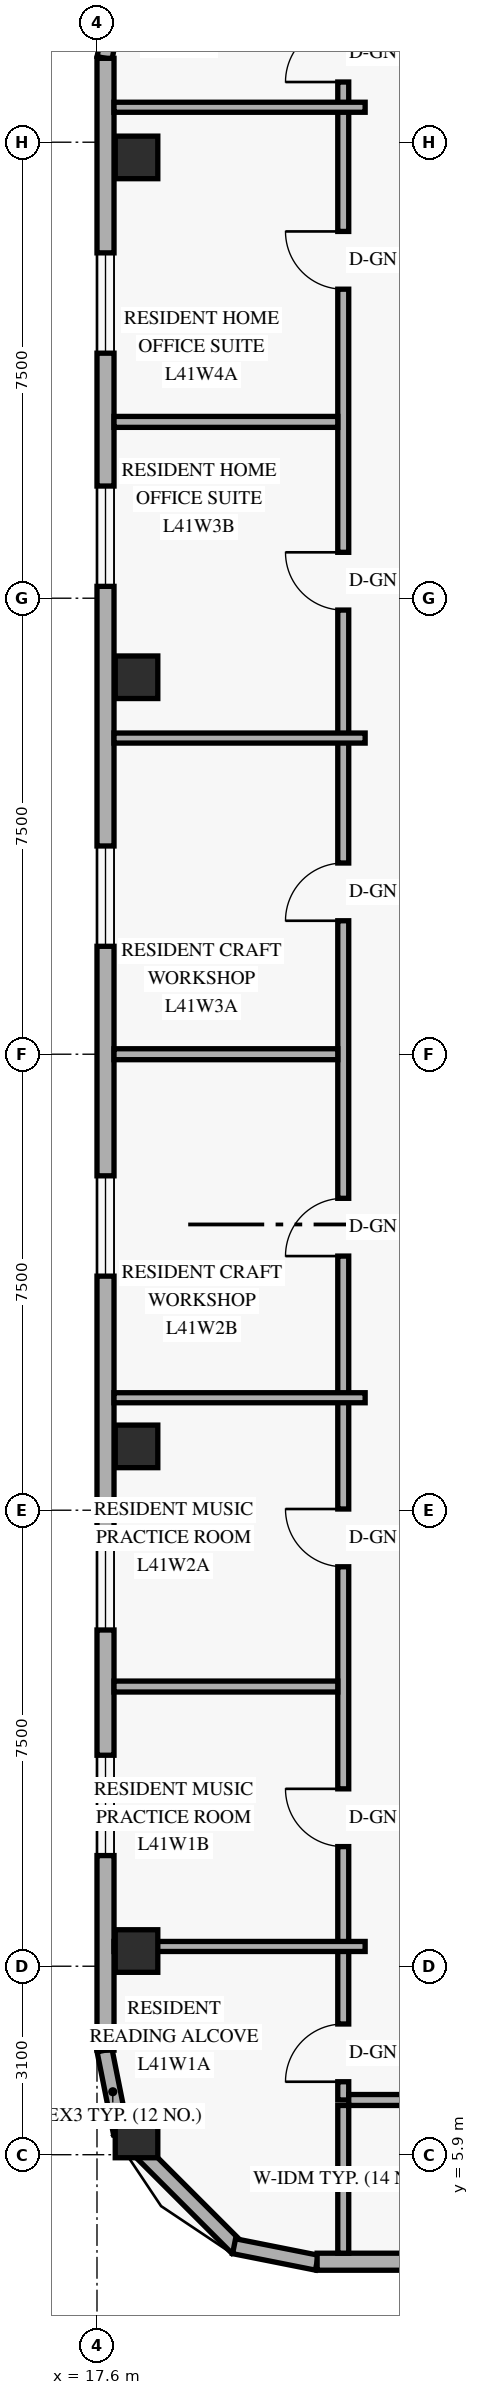
"""IFC4 building model, lengths in metres.
Left out: names, types, materials, properties, quantities, classifications, styles, units other than length and angle.
Written with IfcOpenShell. Run it as: python <this file> out.ifc"""

import sys

from ifc_helpers import new_model, si_unit, direction, frame, frame_2d, origin, origin_2d, place, context, subcontext, project, spatial, rectangle, extrude, element, fill, save


model = new_model("IFC4")
c1 = context("Model", 3, precision=1e-05, world=origin(), true_north=direction((0.0, 1.0)))
c2 = subcontext(c1, "Body", "Model", "MODEL_VIEW")
j1 = project(units=[si_unit("LENGTHUNIT", "METRE"), si_unit("PLANEANGLEUNIT", "RADIAN")], contexts=[c1])
p1 = place(None, origin())
s1 = spatial("IfcSite", under=j1, at=p1, CompositionType="ELEMENT")
p2 = place(p1, origin())
s2 = spatial("IfcBuilding", under=s1, at=p2, CompositionType="ELEMENT")
p3 = place(p2, frame((0.0, 0.0, 159.0)))
s3 = spatial("IfcBuildingStorey", under=s2, at=p3, CompositionType="ELEMENT", Elevation=159.0)
for number, where, z_axis, x_axis in (
    (1, (18.25, 6.2, 0.0), (0.0, 0.0, 1.0), (1.0, 0.0, 0.0)),
    (2, (18.25, 9.25, 0.0), (0.0, 0.0, 1.0), (1.0, 0.0, 0.0)),
    (3, (18.25, 17.55, 0.0), (0.0, 0.0, 1.0), (1.0, 0.0, 0.0)),
    (4, (18.25, 30.2, 0.0), (0.0, 0.0, 1.0), (1.0, 0.0, 0.0)),
    (5, (18.25, 38.75, 0.0), (0.0, 0.0, 1.0), (1.0, 0.0, 0.0)),
):
    element("IfcColumn", number, at=place(p3, frame(where, z_axis=z_axis, x_axis=x_axis)), inside=s3, PredefinedType="COLUMN", context=c2, shape_type="SweptSolid", body=[
        extrude(rectangle(XDim=0.7, YDim=0.7, at=origin_2d()), origin(), (0.0, 0.0, 1.0), 3.6),
    ])
p4 = place(p3, frame((17.724, 7.616, 0.0), z_axis=(0.0, 0.0, 1.0), x_axis=(0.195135625965, -0.9807762678, 0.0)))
e6 = element("IfcWall", 6, at=p4, inside=s3, PredefinedType="SOLIDWALL", context=c2, shape_type="SweptSolid", body=[
    extrude(rectangle(XDim=1.389, YDim=0.25, at=frame_2d((0.694, 0.0))), origin(), (0.0, 0.0, 1.0), 3.36),
])
p5 = place(p3, frame((17.968, 6.305, 0.0), z_axis=(0.0, 0.0, 1.0), x_axis=(0.707106781187, -0.707106781187, 0.0)))
e7 = element("IfcWall", 7, at=p5, inside=s3, PredefinedType="SOLIDWALL", context=c2, shape_type="SweptSolid", body=[
    extrude(rectangle(XDim=2.739, YDim=0.25, at=frame_2d((1.37, 0.0))), origin(), (0.0, 0.0, 1.0), 3.36),
])
for number, where, z_axis, x_axis in (
    (8, (19.854, 4.395, 0.0), (0.0, 0.0, 1.0), (0.981, -0.195, 0.0)),
    (9, (17.995, 41.746, 0.0), (0.0, 0.0, 1.0), (-0.195, -0.981, 0.0)),
):
    element("IfcWall", number, at=place(p3, frame(where, z_axis=z_axis, x_axis=x_axis)), inside=s3, PredefinedType="SOLIDWALL", context=c2, shape_type="SweptSolid", body=[
        extrude(rectangle(XDim=1.389, YDim=0.25, at=frame_2d((0.694, 0.0))), origin(), (0.0, 0.0, 1.0), 3.36),
    ])
p6 = place(p3, frame((21.22, 4.14, 0.0), z_axis=(0.0, 0.0, 1.0), x_axis=(1.0, 0.0, 0.0)))
e10 = element("IfcWall", 10, at=p6, inside=s3, PredefinedType="SOLIDWALL", context=c2, shape_type="SweptSolid", body=[
    extrude(rectangle(XDim=33.76, YDim=0.28, at=frame_2d((16.88, 0.0))), origin(), (0.0, 0.0, 1.0), 3.36),
])
p7 = place(p6, frame((2.13, 0.0, 0.85)))
e11 = element("IfcOpeningElement", 11, at=p7, cuts=e10, PredefinedType="OPENING", context=c2, shape_type="SweptSolid", body=[
    extrude(rectangle(XDim=1.35, YDim=1.55, at=frame_2d((0.675, 0.775))), frame((0.0, 0.15, 0.0), z_axis=(0.0, -1.0, 0.0), x_axis=(1.0, 0.0, 0.0)), (0.0, 0.0, 1.0), 0.3),
])
p8 = place(p6, frame((9.015, 0.0, 0.85)))
e12 = element("IfcOpeningElement", 12, at=p8, cuts=e10, PredefinedType="OPENING", context=c2, shape_type="SweptSolid", body=[
    extrude(rectangle(XDim=1.35, YDim=1.55, at=frame_2d((0.675, 0.775))), frame((0.0, 0.15, 0.0), z_axis=(0.0, -1.0, 0.0), x_axis=(1.0, 0.0, 0.0)), (0.0, 0.0, 1.0), 0.3),
])
p9 = place(p6, frame((14.59, 0.0, 0.85)))
e13 = element("IfcOpeningElement", 13, at=p9, cuts=e10, PredefinedType="OPENING", context=c2, shape_type="SweptSolid", body=[
    extrude(rectangle(XDim=1.35, YDim=1.55, at=frame_2d((0.675, 0.775))), frame((0.0, 0.15, 0.0), z_axis=(0.0, -1.0, 0.0), x_axis=(1.0, 0.0, 0.0)), (0.0, 0.0, 1.0), 0.3),
])
p10 = place(p6, frame((18.635, 0.0, 0.85)))
e14 = element("IfcOpeningElement", 14, at=p10, cuts=e10, PredefinedType="OPENING", context=c2, shape_type="SweptSolid", body=[
    extrude(rectangle(XDim=1.35, YDim=1.55, at=frame_2d((0.675, 0.775))), frame((0.0, 0.15, 0.0), z_axis=(0.0, -1.0, 0.0), x_axis=(1.0, 0.0, 0.0)), (0.0, 0.0, 1.0), 0.3),
])
p11 = place(p6, frame((24.76, 0.0, 0.85)))
e15 = element("IfcOpeningElement", 15, at=p11, cuts=e10, PredefinedType="OPENING", context=c2, shape_type="SweptSolid", body=[
    extrude(rectangle(XDim=1.35, YDim=1.55, at=frame_2d((0.675, 0.775))), frame((0.0, 0.15, 0.0), z_axis=(0.0, -1.0, 0.0), x_axis=(1.0, 0.0, 0.0)), (0.0, 0.0, 1.0), 0.3),
])
p12 = place(p6, frame((30.495, 0.0, 0.85)))
e16 = element("IfcOpeningElement", 16, at=p12, cuts=e10, PredefinedType="OPENING", context=c2, shape_type="SweptSolid", body=[
    extrude(rectangle(XDim=1.35, YDim=1.55, at=frame_2d((0.675, 0.775))), frame((0.0, 0.15, 0.0), z_axis=(0.0, -1.0, 0.0), x_axis=(1.0, 0.0, 0.0)), (0.0, 0.0, 1.0), 0.3),
])
p13 = place(p3, frame((17.74, 40.38, 0.0), z_axis=(0.0, 0.0, 1.0), x_axis=(0.0, -1.0, 0.0)))
e17 = element("IfcWall", 17, at=p13, inside=s3, PredefinedType="SOLIDWALL", context=c2, shape_type="SweptSolid", body=[
    extrude(rectangle(XDim=32.76, YDim=0.28, at=frame_2d((16.38, 0.0))), origin(), (0.0, 0.0, 1.0), 3.36),
])
p14 = place(p13, frame((27.91, 0.0, 0.85)))
e18 = element("IfcOpeningElement", 18, at=p14, cuts=e17, PredefinedType="OPENING", context=c2, shape_type="SweptSolid", body=[
    extrude(rectangle(XDim=1.65, YDim=1.6, at=frame_2d((0.825, 0.8))), frame((0.0, 0.15, 0.0), z_axis=(0.0, -1.0, 0.0), x_axis=(1.0, 0.0, 0.0)), (0.0, 0.0, 1.0), 0.3),
])
p15 = place(p13, frame((24.2, 0.0, 0.85)))
e19 = element("IfcOpeningElement", 19, at=p15, cuts=e17, PredefinedType="OPENING", context=c2, shape_type="SweptSolid", body=[
    extrude(rectangle(XDim=1.65, YDim=1.6, at=frame_2d((0.825, 0.8))), frame((0.0, 0.15, 0.0), z_axis=(0.0, -1.0, 0.0), x_axis=(1.0, 0.0, 0.0)), (0.0, 0.0, 1.0), 0.3),
])
p16 = place(p13, frame((18.38, 0.0, 0.85)))
e20 = element("IfcOpeningElement", 20, at=p16, cuts=e17, PredefinedType="OPENING", context=c2, shape_type="SweptSolid", body=[
    extrude(rectangle(XDim=1.65, YDim=1.6, at=frame_2d((0.825, 0.8))), frame((0.0, 0.15, 0.0), z_axis=(0.0, -1.0, 0.0), x_axis=(1.0, 0.0, 0.0)), (0.0, 0.0, 1.0), 0.3),
])
p17 = place(p13, frame((12.955, 0.0, 0.85)))
e21 = element("IfcOpeningElement", 21, at=p17, cuts=e17, PredefinedType="OPENING", context=c2, shape_type="SweptSolid", body=[
    extrude(rectangle(XDim=1.65, YDim=1.6, at=frame_2d((0.825, 0.8))), frame((0.0, 0.15, 0.0), z_axis=(0.0, -1.0, 0.0), x_axis=(1.0, 0.0, 0.0)), (0.0, 0.0, 1.0), 0.3),
])
p18 = place(p13, frame((7.035, 0.0, 0.85)))
e22 = element("IfcOpeningElement", 22, at=p18, cuts=e17, PredefinedType="OPENING", context=c2, shape_type="SweptSolid", body=[
    extrude(rectangle(XDim=1.65, YDim=1.6, at=frame_2d((0.825, 0.8))), frame((0.0, 0.15, 0.0), z_axis=(0.0, -1.0, 0.0), x_axis=(1.0, 0.0, 0.0)), (0.0, 0.0, 1.0), 0.3),
])
p19 = place(p13, frame((3.2, 0.0, 0.85)))
e23 = element("IfcOpeningElement", 23, at=p19, cuts=e17, PredefinedType="OPENING", context=c2, shape_type="SweptSolid", body=[
    extrude(rectangle(XDim=1.65, YDim=1.6, at=frame_2d((0.825, 0.8))), frame((0.0, 0.15, 0.0), z_axis=(0.0, -1.0, 0.0), x_axis=(1.0, 0.0, 0.0)), (0.0, 0.0, 1.0), 0.3),
])
p20 = place(p3, frame((21.65, 6.8, 0.0), z_axis=(0.0, 0.0, 1.0), x_axis=(0.0, 1.0, 0.0)))
e24 = element("IfcWall", 24, at=p20, inside=s3, PredefinedType="STANDARD", context=c2, shape_type="SweptSolid", body=[
    extrude(rectangle(XDim=34.4, YDim=0.18, at=frame_2d((17.2, 0.0))), origin(), (0.0, 0.0, 1.0), 2.73),
])
p21 = place(p20, frame((0.3, 0.0, 0.0)))
e25 = element("IfcOpeningElement", 25, at=p21, cuts=e24, PredefinedType="OPENING", context=c2, shape_type="SweptSolid", body=[
    extrude(rectangle(XDim=0.95, YDim=2.15, at=frame_2d((0.475, 1.075))), frame((0.0, 0.1, 0.0), z_axis=(0.0, -1.0, 0.0), x_axis=(1.0, 0.0, 0.0)), (0.0, 0.0, 1.0), 0.2),
])
p22 = place(p20, frame((4.167, 0.0, 0.0)))
e26 = element("IfcOpeningElement", 26, at=p22, cuts=e24, PredefinedType="OPENING", context=c2, shape_type="SweptSolid", body=[
    extrude(rectangle(XDim=0.95, YDim=2.15, at=frame_2d((0.475, 1.075))), frame((0.0, 0.1, 0.0), z_axis=(0.0, -1.0, 0.0), x_axis=(1.0, 0.0, 0.0)), (0.0, 0.0, 1.0), 0.2),
])
p23 = place(p20, frame((8.77, 0.0, 0.0)))
e27 = element("IfcOpeningElement", 27, at=p23, cuts=e24, PredefinedType="OPENING", context=c2, shape_type="SweptSolid", body=[
    extrude(rectangle(XDim=0.95, YDim=2.15, at=frame_2d((0.475, 1.075))), frame((0.0, 0.1, 0.0), z_axis=(0.0, -1.0, 0.0), x_axis=(1.0, 0.0, 0.0)), (0.0, 0.0, 1.0), 0.2),
])
p24 = place(p20, frame((13.88, 0.0, 0.0)))
e28 = element("IfcOpeningElement", 28, at=p24, cuts=e24, PredefinedType="OPENING", context=c2, shape_type="SweptSolid", body=[
    extrude(rectangle(XDim=0.95, YDim=2.15, at=frame_2d((0.475, 1.075))), frame((0.0, 0.1, 0.0), z_axis=(0.0, -1.0, 0.0), x_axis=(1.0, 0.0, 0.0)), (0.0, 0.0, 1.0), 0.2),
])
p25 = place(p20, frame((19.395, 0.0, 0.0)))
e29 = element("IfcOpeningElement", 29, at=p25, cuts=e24, PredefinedType="OPENING", context=c2, shape_type="SweptSolid", body=[
    extrude(rectangle(XDim=0.95, YDim=2.15, at=frame_2d((0.475, 1.075))), frame((0.0, 0.1, 0.0), z_axis=(0.0, -1.0, 0.0), x_axis=(1.0, 0.0, 0.0)), (0.0, 0.0, 1.0), 0.2),
])
p26 = place(p20, frame((24.505, 0.0, 0.0)))
e30 = element("IfcOpeningElement", 30, at=p26, cuts=e24, PredefinedType="OPENING", context=c2, shape_type="SweptSolid", body=[
    extrude(rectangle(XDim=0.95, YDim=2.15, at=frame_2d((0.475, 1.075))), frame((0.0, 0.1, 0.0), z_axis=(0.0, -1.0, 0.0), x_axis=(1.0, 0.0, 0.0)), (0.0, 0.0, 1.0), 0.2),
])
p27 = place(p20, frame((29.782, 0.0, 0.0)))
e31 = element("IfcOpeningElement", 31, at=p27, cuts=e24, PredefinedType="OPENING", context=c2, shape_type="SweptSolid", body=[
    extrude(rectangle(XDim=0.95, YDim=2.15, at=frame_2d((0.475, 1.075))), frame((0.0, 0.1, 0.0), z_axis=(0.0, -1.0, 0.0), x_axis=(1.0, 0.0, 0.0)), (0.0, 0.0, 1.0), 0.2),
])
p28 = place(p20, frame((33.19, 0.0, 0.0)))
e32 = element("IfcOpeningElement", 32, at=p28, cuts=e24, PredefinedType="OPENING", context=c2, shape_type="SweptSolid", body=[
    extrude(rectangle(XDim=0.95, YDim=2.15, at=frame_2d((0.475, 1.075))), frame((0.0, 0.1, 0.0), z_axis=(0.0, -1.0, 0.0), x_axis=(1.0, 0.0, 0.0)), (0.0, 0.0, 1.0), 0.2),
])
p29 = place(p3, frame((21.74, 6.8, 0.0), z_axis=(0.0, 0.0, 1.0), x_axis=(1.0, 0.0, 0.0)))
e33 = element("IfcWall", 33, at=p29, inside=s3, PredefinedType="STANDARD", context=c2, shape_type="SweptSolid", body=[
    extrude(rectangle(XDim=13.68, YDim=0.18, at=frame_2d((6.84, 0.0))), origin(), (0.0, 0.0, 1.0), 2.73),
])
p30 = place(p29, frame((0.97, 0.0, 0.0)))
e34 = element("IfcOpeningElement", 34, at=p30, cuts=e33, PredefinedType="OPENING", context=c2, shape_type="SweptSolid", body=[
    extrude(rectangle(XDim=0.95, YDim=2.15, at=frame_2d((0.475, 1.075))), frame((0.0, 0.1, 0.0), z_axis=(0.0, -1.0, 0.0), x_axis=(1.0, 0.0, 0.0)), (0.0, 0.0, 1.0), 0.2),
])
p31 = place(p29, frame((9.11, 0.0, 0.0)))
e35 = element("IfcOpeningElement", 35, at=p31, cuts=e33, PredefinedType="OPENING", context=c2, shape_type="SweptSolid", body=[
    extrude(rectangle(XDim=0.95, YDim=2.15, at=frame_2d((0.475, 1.075))), frame((0.0, 0.1, 0.0), z_axis=(0.0, -1.0, 0.0), x_axis=(1.0, 0.0, 0.0)), (0.0, 0.0, 1.0), 0.2),
])
p32 = place(p3, frame((21.65, 4.28, 0.0), z_axis=(0.0, 0.0, 1.0), x_axis=(0.0, 1.0, 0.0)))
e36 = element("IfcWall", 36, at=p32, inside=s3, PredefinedType="PARTITIONING", context=c2, shape_type="SweptSolid", body=[
    extrude(rectangle(XDim=2.43, YDim=0.18, at=frame_2d((1.215, 0.0))), origin(), (0.0, 0.0, 1.0), 2.879),
])
p33 = place(p3, frame((17.88, 9.325, 0.0), z_axis=(0.0, 0.0, 1.0), x_axis=(1.0, 0.0, 0.0)))
e37 = element("IfcWall", 37, at=p33, inside=s3, PredefinedType="PARTITIONING", context=c2, shape_type="SweptSolid", body=[
    extrude(rectangle(XDim=4.13, YDim=0.165, at=frame_2d((2.065, 0.0))), origin(), (0.0, 0.0, 1.0), 2.73),
])
p34 = place(p3, frame((17.88, 13.6, 0.0), z_axis=(0.0, 0.0, 1.0), x_axis=(1.0, 0.0, 0.0)))
e38 = element("IfcWall", 38, at=p34, inside=s3, PredefinedType="PARTITIONING", context=c2, shape_type="SweptSolid", body=[
    extrude(rectangle(XDim=3.68, YDim=0.18, at=frame_2d((1.84, 0.0))), origin(), (0.0, 0.0, 1.0), 2.879),
])
p35 = place(p3, frame((17.88, 18.35, 0.0), z_axis=(0.0, 0.0, 1.0), x_axis=(1.0, 0.0, 0.0)))
e39 = element("IfcWall", 39, at=p35, inside=s3, PredefinedType="PARTITIONING", context=c2, shape_type="SweptSolid", body=[
    extrude(rectangle(XDim=4.13, YDim=0.165, at=frame_2d((2.065, 0.0))), origin(), (0.0, 0.0, 1.0), 2.879),
])
p36 = place(p3, frame((17.88, 24.0, 0.0), z_axis=(0.0, 0.0, 1.0), x_axis=(1.0, 0.0, 0.0)))
e40 = element("IfcWall", 40, at=p36, inside=s3, PredefinedType="PARTITIONING", context=c2, shape_type="SweptSolid", body=[
    extrude(rectangle(XDim=3.68, YDim=0.18, at=frame_2d((1.84, 0.0))), origin(), (0.0, 0.0, 1.0), 2.879),
])
p37 = place(p3, frame((17.88, 29.2, 0.0), z_axis=(0.0, 0.0, 1.0), x_axis=(1.0, 0.0, 0.0)))
e41 = element("IfcWall", 41, at=p37, inside=s3, PredefinedType="PARTITIONING", context=c2, shape_type="SweptSolid", body=[
    extrude(rectangle(XDim=4.13, YDim=0.165, at=frame_2d((2.065, 0.0))), origin(), (0.0, 0.0, 1.0), 2.879),
])
p38 = place(p3, frame((17.88, 34.4, 0.0), z_axis=(0.0, 0.0, 1.0), x_axis=(1.0, 0.0, 0.0)))
e42 = element("IfcWall", 42, at=p38, inside=s3, PredefinedType="PARTITIONING", context=c2, shape_type="SweptSolid", body=[
    extrude(rectangle(XDim=3.68, YDim=0.18, at=frame_2d((1.84, 0.0))), origin(), (0.0, 0.0, 1.0), 2.879),
])
p39 = place(p3, frame((17.88, 39.575, 0.0), z_axis=(0.0, 0.0, 1.0), x_axis=(1.0, 0.0, 0.0)))
e43 = element("IfcWall", 43, at=p39, inside=s3, PredefinedType="PARTITIONING", context=c2, shape_type="SweptSolid", body=[
    extrude(rectangle(XDim=4.13, YDim=0.165, at=frame_2d((2.065, 0.0))), origin(), (0.0, 0.0, 1.0), 2.879),
])
p40 = place(p14, origin())
e44 = element("IfcWindow", 44, at=p40, inside=s3, PartitioningType="SINGLE_PANEL", PredefinedType="WINDOW", context=c2, shape_type="SweptSolid", body=[
    extrude(rectangle(XDim=1.65, YDim=1.6, at=frame_2d((0.825, 0.8))), frame((0.0, 0.03, 0.0), z_axis=(0.0, -1.0, 0.0), x_axis=(1.0, 0.0, 0.0)), (0.0, 0.0, 1.0), 0.06),
])
fill(e18, e44)
p41 = place(p15, origin())
e45 = element("IfcWindow", 45, at=p41, inside=s3, PartitioningType="SINGLE_PANEL", PredefinedType="WINDOW", context=c2, shape_type="SweptSolid", body=[
    extrude(rectangle(XDim=1.65, YDim=1.6, at=frame_2d((0.825, 0.8))), frame((0.0, 0.03, 0.0), z_axis=(0.0, -1.0, 0.0), x_axis=(1.0, 0.0, 0.0)), (0.0, 0.0, 1.0), 0.06),
])
fill(e19, e45)
p42 = place(p16, origin())
e46 = element("IfcWindow", 46, at=p42, inside=s3, PartitioningType="SINGLE_PANEL", PredefinedType="WINDOW", context=c2, shape_type="SweptSolid", body=[
    extrude(rectangle(XDim=1.65, YDim=1.6, at=frame_2d((0.825, 0.8))), frame((0.0, 0.03, 0.0), z_axis=(0.0, -1.0, 0.0), x_axis=(1.0, 0.0, 0.0)), (0.0, 0.0, 1.0), 0.06),
])
fill(e20, e46)
p43 = place(p17, origin())
e47 = element("IfcWindow", 47, at=p43, inside=s3, PartitioningType="SINGLE_PANEL", PredefinedType="WINDOW", context=c2, shape_type="SweptSolid", body=[
    extrude(rectangle(XDim=1.65, YDim=1.6, at=frame_2d((0.825, 0.8))), frame((0.0, 0.03, 0.0), z_axis=(0.0, -1.0, 0.0), x_axis=(1.0, 0.0, 0.0)), (0.0, 0.0, 1.0), 0.06),
])
fill(e21, e47)
p44 = place(p18, origin())
e48 = element("IfcWindow", 48, at=p44, inside=s3, PartitioningType="SINGLE_PANEL", PredefinedType="WINDOW", context=c2, shape_type="SweptSolid", body=[
    extrude(rectangle(XDim=1.65, YDim=1.6, at=frame_2d((0.825, 0.8))), frame((0.0, 0.03, 0.0), z_axis=(0.0, -1.0, 0.0), x_axis=(1.0, 0.0, 0.0)), (0.0, 0.0, 1.0), 0.06),
])
fill(e22, e48)
p45 = place(p19, origin())
e49 = element("IfcWindow", 49, at=p45, inside=s3, PartitioningType="SINGLE_PANEL", PredefinedType="WINDOW", context=c2, shape_type="SweptSolid", body=[
    extrude(rectangle(XDim=1.65, YDim=1.6, at=frame_2d((0.825, 0.8))), frame((0.0, 0.03, 0.0), z_axis=(0.0, -1.0, 0.0), x_axis=(1.0, 0.0, 0.0)), (0.0, 0.0, 1.0), 0.06),
])
fill(e23, e49)
p46 = place(p21, origin())
e50 = element("IfcDoor", 50, at=p46, inside=s3, OperationType="SINGLE_SWING_LEFT", PredefinedType="DOOR", context=c2, shape_type="SweptSolid", body=[
    extrude(rectangle(XDim=0.95, YDim=2.15, at=frame_2d((0.475, 1.075))), frame((0.0, 0.025, 0.0), z_axis=(0.0, -1.0, 0.0), x_axis=(1.0, 0.0, 0.0)), (0.0, 0.0, 1.0), 0.05),
])
fill(e25, e50)
p47 = place(p22, origin())
e51 = element("IfcDoor", 51, at=p47, inside=s3, OperationType="SINGLE_SWING_RIGHT", PredefinedType="DOOR", context=c2, shape_type="SweptSolid", body=[
    extrude(rectangle(XDim=0.95, YDim=2.15, at=frame_2d((0.475, 1.075))), frame((0.0, 0.025, 0.0), z_axis=(0.0, -1.0, 0.0), x_axis=(1.0, 0.0, 0.0)), (0.0, 0.0, 1.0), 0.05),
])
fill(e26, e51)
p48 = place(p23, origin())
e52 = element("IfcDoor", 52, at=p48, inside=s3, OperationType="SINGLE_SWING_RIGHT", PredefinedType="DOOR", context=c2, shape_type="SweptSolid", body=[
    extrude(rectangle(XDim=0.95, YDim=2.15, at=frame_2d((0.475, 1.075))), frame((0.0, 0.025, 0.0), z_axis=(0.0, -1.0, 0.0), x_axis=(1.0, 0.0, 0.0)), (0.0, 0.0, 1.0), 0.05),
])
fill(e27, e52)
p49 = place(p24, origin())
e53 = element("IfcDoor", 53, at=p49, inside=s3, OperationType="SINGLE_SWING_LEFT", PredefinedType="DOOR", context=c2, shape_type="SweptSolid", body=[
    extrude(rectangle(XDim=0.95, YDim=2.15, at=frame_2d((0.475, 1.075))), frame((0.0, 0.025, 0.0), z_axis=(0.0, -1.0, 0.0), x_axis=(1.0, 0.0, 0.0)), (0.0, 0.0, 1.0), 0.05),
])
fill(e28, e53)
p50 = place(p25, origin())
e54 = element("IfcDoor", 54, at=p50, inside=s3, OperationType="SINGLE_SWING_LEFT", PredefinedType="DOOR", context=c2, shape_type="SweptSolid", body=[
    extrude(rectangle(XDim=0.95, YDim=2.15, at=frame_2d((0.475, 1.075))), frame((0.0, 0.025, 0.0), z_axis=(0.0, -1.0, 0.0), x_axis=(1.0, 0.0, 0.0)), (0.0, 0.0, 1.0), 0.05),
])
fill(e29, e54)
p51 = place(p26, origin())
e55 = element("IfcDoor", 55, at=p51, inside=s3, OperationType="SINGLE_SWING_RIGHT", PredefinedType="DOOR", context=c2, shape_type="SweptSolid", body=[
    extrude(rectangle(XDim=0.95, YDim=2.15, at=frame_2d((0.475, 1.075))), frame((0.0, 0.025, 0.0), z_axis=(0.0, -1.0, 0.0), x_axis=(1.0, 0.0, 0.0)), (0.0, 0.0, 1.0), 0.05),
])
fill(e30, e55)
p52 = place(p27, origin())
e56 = element("IfcDoor", 56, at=p52, inside=s3, OperationType="SINGLE_SWING_RIGHT", PredefinedType="DOOR", context=c2, shape_type="SweptSolid", body=[
    extrude(rectangle(XDim=0.95, YDim=2.15, at=frame_2d((0.475, 1.075))), frame((0.0, 0.025, 0.0), z_axis=(0.0, -1.0, 0.0), x_axis=(1.0, 0.0, 0.0)), (0.0, 0.0, 1.0), 0.05),
])
fill(e31, e56)
p53 = place(p28, origin())
e57 = element("IfcDoor", 57, at=p53, inside=s3, OperationType="SINGLE_SWING_LEFT", PredefinedType="DOOR", context=c2, shape_type="SweptSolid", body=[
    extrude(rectangle(XDim=0.95, YDim=2.15, at=frame_2d((0.475, 1.075))), frame((0.0, 0.025, 0.0), z_axis=(0.0, -1.0, 0.0), x_axis=(1.0, 0.0, 0.0)), (0.0, 0.0, 1.0), 0.05),
])
fill(e32, e57)
save(model, sys.argv[1])
